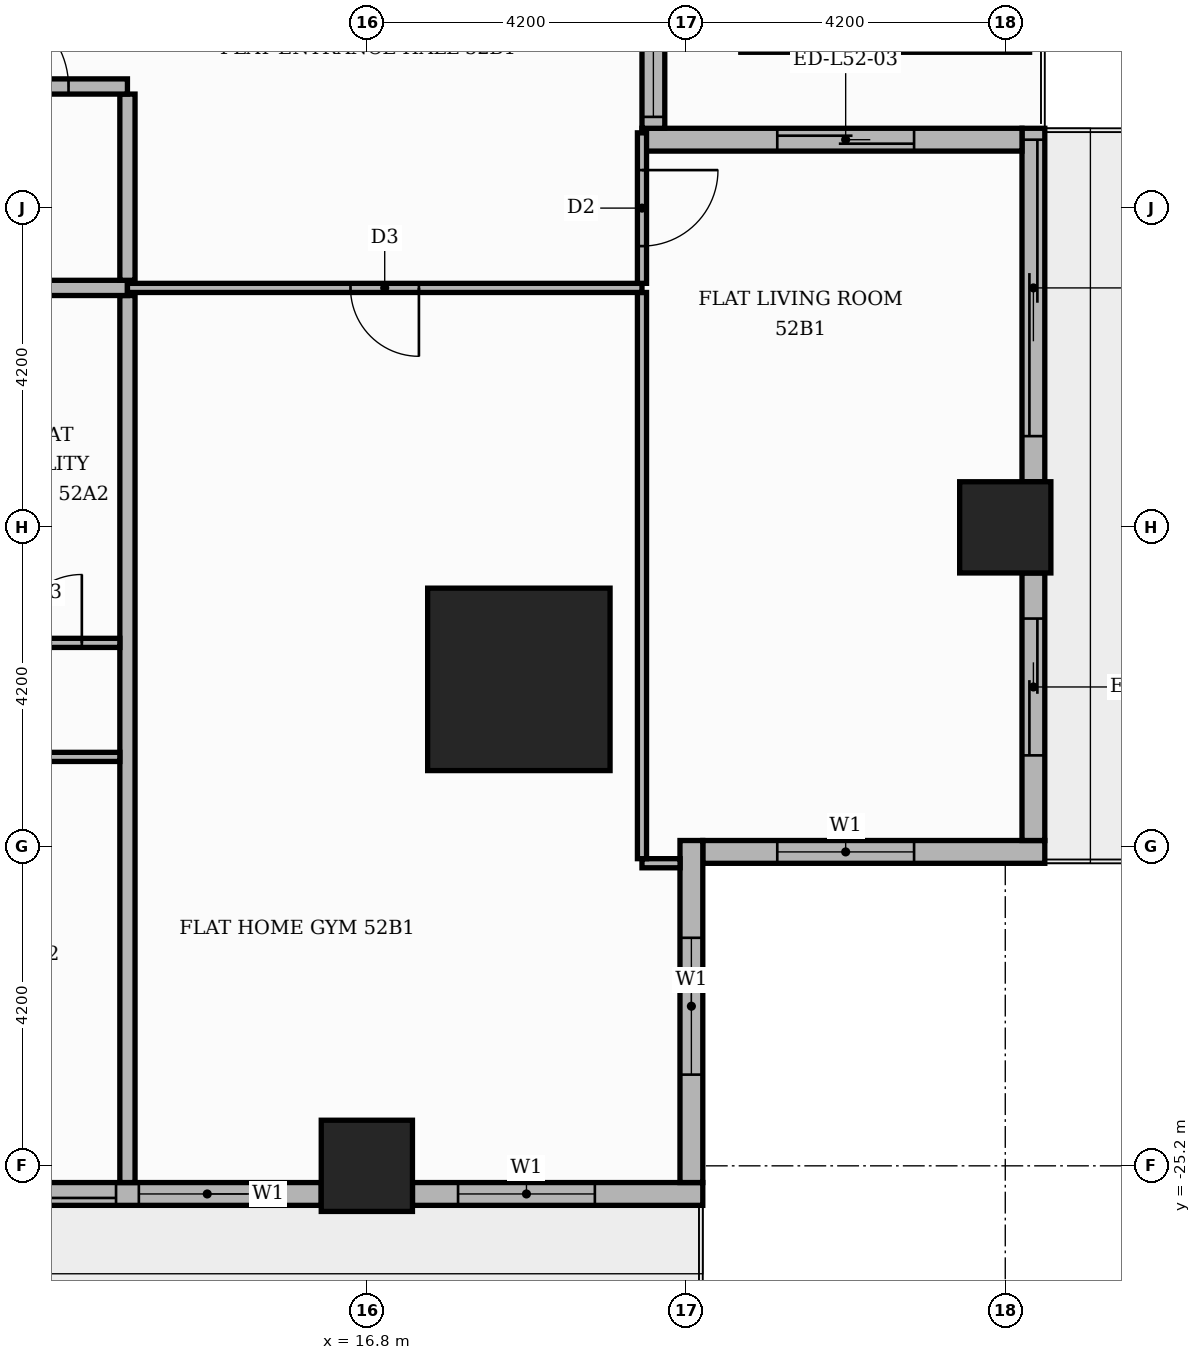
"""IFC4 building model, lengths in metres.
Left out: names, types, materials, properties, quantities, classifications, styles, units other than length and angle.
Written with IfcOpenShell. Run it as: python <this file> out.ifc"""

import sys

from ifc_helpers import new_model, si_unit, direction, frame, frame_2d, origin, origin_2d, place, context, subcontext, project, spatial, rectangle, extrude, element, fill, save


model = new_model("IFC4")
c1 = context("Model", 3, precision=1e-05, world=origin(), true_north=direction((0.0, 1.0)))
c2 = subcontext(c1, "Body", "Model", "MODEL_VIEW")
j1 = project(units=[si_unit("LENGTHUNIT", "METRE"), si_unit("PLANEANGLEUNIT", "RADIAN")], contexts=[c1])
p1 = place(None, origin())
s1 = spatial("IfcSite", under=j1, at=p1, CompositionType="ELEMENT")
p2 = place(p1, origin())
s2 = spatial("IfcBuilding", under=s1, at=p2, CompositionType="ELEMENT")
p3 = place(p2, frame((0.0, 0.0, 219.6)))
s3 = spatial("IfcBuildingStorey", under=s2, at=p3, CompositionType="ELEMENT", Elevation=219.6)
p4 = place(p3, frame((18.8, -18.8, 0.0), z_axis=(0.0, 0.0, 1.0), x_axis=(1.0, 0.0, 0.0)))
e1 = element("IfcColumn", 1, at=p4, inside=s3, PredefinedType="COLUMN", context=c2, shape_type="SweptSolid", body=[
    extrude(rectangle(XDim=2.4, YDim=2.4, at=origin_2d()), origin(), (0.0, 0.0, 1.0), 3.9),
])
for number, where, z_axis, x_axis in (
    (2, (25.2, -16.8, 0.0), (0.0, 0.0, 1.0), (1.0, 0.0, 0.0)),
    (3, (16.8, -25.2, 0.0), (0.0, 0.0, 1.0), (1.0, 0.0, 0.0)),
):
    element("IfcColumn", number, at=place(p3, frame(where, z_axis=z_axis, x_axis=x_axis)), inside=s3, PredefinedType="COLUMN", context=c2, shape_type="SweptSolid", body=[
        extrude(rectangle(XDim=1.2, YDim=1.2, at=origin_2d()), origin(), (0.0, 0.0, 1.0), 3.9),
    ])
p5 = place(p3, frame((21.22, -21.07, 0.0), z_axis=(0.0, 0.0, 1.0), x_axis=(1.0, 0.0, 0.0)))
e4 = element("IfcWall", 4, at=p5, inside=s3, PredefinedType="STANDARD", context=c2, shape_type="SweptSolid", body=[
    extrude(rectangle(XDim=4.5, YDim=0.3, at=frame_2d((2.25, 0.0))), origin(), (0.0, 0.0, 1.0), 3.48),
])
p6 = place(p5, frame((0.98, 0.0, 0.9)))
e5 = element("IfcOpeningElement", 5, at=p6, cuts=e4, PredefinedType="OPENING", context=c2, shape_type="SweptSolid", body=[
    extrude(rectangle(XDim=1.8, YDim=2.1, at=frame_2d((0.9, 1.05))), frame((0.0, 0.16, 0.0), z_axis=(0.0, -1.0, 0.0), x_axis=(1.0, 0.0, 0.0)), (0.0, 0.0, 1.0), 0.32),
])
p7 = place(p3, frame((25.57, -20.92, 0.0), z_axis=(0.0, 0.0, 1.0), x_axis=(0.0, 1.0, 0.0)))
e6 = element("IfcWall", 6, at=p7, inside=s3, PredefinedType="STANDARD", context=c2, shape_type="SweptSolid", body=[
    extrude(rectangle(XDim=3.52, YDim=0.3, at=frame_2d((1.76, 0.0))), origin(), (0.0, 0.0, 1.0), 3.48),
])
p8 = place(p7, frame((1.12, 0.0, 0.0)))
e7 = element("IfcOpeningElement", 7, at=p8, cuts=e6, PredefinedType="OPENING", context=c2, shape_type="SweptSolid", body=[
    extrude(rectangle(XDim=1.8, YDim=2.4, at=frame_2d((0.9, 1.2))), frame((0.0, 0.16, 0.0), z_axis=(0.0, -1.0, 0.0), x_axis=(1.0, 0.0, 0.0)), (0.0, 0.0, 1.0), 0.32),
])
p9 = place(p3, frame((25.57, -16.2, 0.0), z_axis=(0.0, 0.0, 1.0), x_axis=(0.0, 1.0, 0.0)))
e8 = element("IfcWall", 8, at=p9, inside=s3, PredefinedType="STANDARD", context=c2, shape_type="SweptSolid", body=[
    extrude(rectangle(XDim=4.65, YDim=0.3, at=frame_2d((2.325, 0.0))), origin(), (0.0, 0.0, 1.0), 3.48),
])
p10 = place(p9, frame((0.6, 0.0, 0.0)))
e9 = element("IfcOpeningElement", 9, at=p10, cuts=e8, PredefinedType="OPENING", context=c2, shape_type="SweptSolid", body=[
    extrude(rectangle(XDim=3.9, YDim=2.4, at=frame_2d((1.95, 1.2))), frame((0.0, 0.16, 0.0), z_axis=(0.0, -1.0, 0.0), x_axis=(1.0, 0.0, 0.0)), (0.0, 0.0, 1.0), 0.32),
])
p11 = place(p3, frame((25.42, -11.7, 0.0), z_axis=(0.0, 0.0, 1.0), x_axis=(-1.0, 0.0, 0.0)))
e10 = element("IfcWall", 10, at=p11, inside=s3, PredefinedType="STANDARD", context=c2, shape_type="SweptSolid", body=[
    extrude(rectangle(XDim=5.0, YDim=0.3, at=frame_2d((2.5, 0.0))), origin(), (0.0, 0.0, 1.0), 3.48),
])
p12 = place(p11, frame((1.42, 0.0, 0.0)))
e11 = element("IfcOpeningElement", 11, at=p12, cuts=e10, PredefinedType="OPENING", context=c2, shape_type="SweptSolid", body=[
    extrude(rectangle(XDim=1.8, YDim=2.4, at=frame_2d((0.9, 1.2))), frame((0.0, 0.16, 0.0), z_axis=(0.0, -1.0, 0.0), x_axis=(1.0, 0.0, 0.0)), (0.0, 0.0, 1.0), 0.32),
])
p13 = place(p3, frame((20.57, -11.55, 0.0), z_axis=(0.0, 0.0, 1.0), x_axis=(0.0, 1.0, 0.0)))
e12 = element("IfcWall", 12, at=p13, inside=s3, PredefinedType="STANDARD", context=c2, shape_type="SweptSolid", body=[
    extrude(rectangle(XDim=23.4, YDim=0.3, at=frame_2d((11.7, 0.0))), origin(), (0.0, 0.0, 1.0), 3.48),
])
p14 = place(p13, frame((0.15, 0.0, 0.9)))
e13 = element("IfcOpeningElement", 13, at=p14, cuts=e12, PredefinedType="OPENING", context=c2, shape_type="SweptSolid", body=[
    extrude(rectangle(XDim=6.0, YDim=2.1, at=frame_2d((3.0, 1.05))), frame((0.0, 0.16, 0.0), z_axis=(0.0, -1.0, 0.0), x_axis=(1.0, 0.0, 0.0)), (0.0, 0.0, 1.0), 0.32),
])
p15 = place(p13, frame((6.45, 0.0, 0.9)))
e14 = element("IfcOpeningElement", 14, at=p15, cuts=e12, PredefinedType="OPENING", context=c2, shape_type="SweptSolid", body=[
    extrude(rectangle(XDim=6.0, YDim=2.1, at=frame_2d((3.0, 1.05))), frame((0.0, 0.16, 0.0), z_axis=(0.0, -1.0, 0.0), x_axis=(1.0, 0.0, 0.0)), (0.0, 0.0, 1.0), 0.32),
])
p16 = place(p13, frame((12.75, 0.0, 0.9)))
e15 = element("IfcOpeningElement", 15, at=p16, cuts=e12, PredefinedType="OPENING", context=c2, shape_type="SweptSolid", body=[
    extrude(rectangle(XDim=6.0, YDim=2.1, at=frame_2d((3.0, 1.05))), frame((0.0, 0.16, 0.0), z_axis=(0.0, -1.0, 0.0), x_axis=(1.0, 0.0, 0.0)), (0.0, 0.0, 1.0), 0.32),
])
p17 = place(p13, frame((19.05, 0.0, 0.9)))
e16 = element("IfcOpeningElement", 16, at=p17, cuts=e12, PredefinedType="OPENING", context=c2, shape_type="SweptSolid", body=[
    extrude(rectangle(XDim=3.9, YDim=2.1, at=frame_2d((1.95, 1.05))), frame((0.0, 0.16, 0.0), z_axis=(0.0, -1.0, 0.0), x_axis=(1.0, 0.0, 0.0)), (0.0, 0.0, 1.0), 0.32),
])
p18 = place(p3, frame((9.0, -25.57, 0.0), z_axis=(0.0, 0.0, 1.0), x_axis=(1.0, 0.0, 0.0)))
e17 = element("IfcWall", 17, at=p18, inside=s3, PredefinedType="STANDARD", context=c2, shape_type="SweptSolid", body=[
    extrude(rectangle(XDim=7.2, YDim=0.3, at=frame_2d((3.6, 0.0))), origin(), (0.0, 0.0, 1.0), 3.48),
])
p19 = place(p18, frame((0.6, 0.0, 0.0)))
e18 = element("IfcOpeningElement", 18, at=p19, cuts=e17, PredefinedType="OPENING", context=c2, shape_type="SweptSolid", body=[
    extrude(rectangle(XDim=3.9, YDim=2.4, at=frame_2d((1.95, 1.2))), frame((0.0, 0.16, 0.0), z_axis=(0.0, -1.0, 0.0), x_axis=(1.0, 0.0, 0.0)), (0.0, 0.0, 1.0), 0.32),
])
p20 = place(p18, frame((4.8, 0.0, 0.9)))
e19 = element("IfcOpeningElement", 19, at=p20, cuts=e17, PredefinedType="OPENING", context=c2, shape_type="SweptSolid", body=[
    extrude(rectangle(XDim=1.8, YDim=2.1, at=frame_2d((0.9, 1.05))), frame((0.0, 0.16, 0.0), z_axis=(0.0, -1.0, 0.0), x_axis=(1.0, 0.0, 0.0)), (0.0, 0.0, 1.0), 0.32),
])
p21 = place(p3, frame((17.4, -25.57, 0.0), z_axis=(0.0, 0.0, 1.0), x_axis=(1.0, 0.0, 0.0)))
e20 = element("IfcWall", 20, at=p21, inside=s3, PredefinedType="STANDARD", context=c2, shape_type="SweptSolid", body=[
    extrude(rectangle(XDim=3.82, YDim=0.3, at=frame_2d((1.91, 0.0))), origin(), (0.0, 0.0, 1.0), 3.48),
])
p22 = place(p21, frame((0.6, 0.0, 0.9)))
e21 = element("IfcOpeningElement", 21, at=p22, cuts=e20, PredefinedType="OPENING", context=c2, shape_type="SweptSolid", body=[
    extrude(rectangle(XDim=1.8, YDim=2.1, at=frame_2d((0.9, 1.05))), frame((0.0, 0.16, 0.0), z_axis=(0.0, -1.0, 0.0), x_axis=(1.0, 0.0, 0.0)), (0.0, 0.0, 1.0), 0.32),
])
p23 = place(p3, frame((21.07, -25.42, 0.0), z_axis=(0.0, 0.0, 1.0), x_axis=(0.0, 1.0, 0.0)))
e22 = element("IfcWall", 22, at=p23, inside=s3, PredefinedType="STANDARD", context=c2, shape_type="SweptSolid", body=[
    extrude(rectangle(XDim=4.5, YDim=0.3, at=frame_2d((2.25, 0.0))), origin(), (0.0, 0.0, 1.0), 3.48),
])
p24 = place(p23, frame((1.42, 0.0, 0.9)))
e23 = element("IfcOpeningElement", 23, at=p24, cuts=e22, PredefinedType="OPENING", context=c2, shape_type="SweptSolid", body=[
    extrude(rectangle(XDim=1.8, YDim=2.1, at=frame_2d((0.9, 1.05))), frame((0.0, 0.16, 0.0), z_axis=(0.0, -1.0, 0.0), x_axis=(1.0, 0.0, 0.0)), (0.0, 0.0, 1.0), 0.32),
])
p25 = place(p3, frame((13.65, -25.42, 0.0), z_axis=(0.0, 0.0, 1.0), x_axis=(0.0, 1.0, 0.0)))
e24 = element("IfcWall", 24, at=p25, inside=s3, PredefinedType="PARTITIONING", context=c2, shape_type="SweptSolid", body=[
    extrude(rectangle(XDim=11.67, YDim=0.2, at=frame_2d((5.835, 0.0))), origin(), (0.0, 0.0, 1.0), 3.48),
])
p26 = place(p3, frame((20.42, -21.219, 0.0), z_axis=(0.0, 0.0, 1.0), x_axis=(1.0, 0.0, 0.0)))
e25 = element("IfcWall", 25, at=p26, inside=s3, PredefinedType="PARTITIONING", context=c2, shape_type="SweptSolid", body=[
    extrude(rectangle(XDim=0.501, YDim=0.12, at=frame_2d((0.25, 0.0))), origin(), (0.0, 0.0, 1.0), 3.48),
])
p27 = place(p3, frame((20.42, -21.159, 0.0), z_axis=(0.0, 0.0, 1.0), x_axis=(0.0, 1.0, 0.0)))
e26 = element("IfcWall", 26, at=p27, inside=s3, PredefinedType="PARTITIONING", context=c2, shape_type="SweptSolid", body=[
    extrude(rectangle(XDim=7.449, YDim=0.12, at=frame_2d((3.725, 0.0))), origin(), (0.0, 0.0, 1.0), 3.48),
])
p28 = place(p3, frame((-5.15, -19.82, 0.0), z_axis=(0.0, 0.0, 1.0), x_axis=(1.0, 0.0, 0.0)))
e27 = element("IfcWall", 27, at=p28, inside=s3, PredefinedType="PARTITIONING", context=c2, shape_type="SweptSolid", body=[
    extrude(rectangle(XDim=18.7, YDim=0.12, at=frame_2d((9.35, 0.0))), origin(), (0.0, 0.0, 1.0), 3.48),
])
p29 = place(p28, frame((3.65, 0.0, 0.0)))
e28 = element("IfcOpeningElement", 28, at=p29, cuts=e27, PredefinedType="OPENING", context=c2, shape_type="SweptSolid", body=[
    extrude(rectangle(XDim=0.9, YDim=2.1, at=frame_2d((0.45, 1.05))), frame((0.0, 0.07, 0.0), z_axis=(0.0, -1.0, 0.0), x_axis=(1.0, 0.0, 0.0)), (0.0, 0.0, 1.0), 0.14),
])
p30 = place(p28, frame((15.15, 0.0, 0.0)))
e29 = element("IfcOpeningElement", 29, at=p30, cuts=e27, PredefinedType="OPENING", context=c2, shape_type="SweptSolid", body=[
    extrude(rectangle(XDim=1.0, YDim=2.1, at=frame_2d((0.5, 1.05))), frame((0.0, 0.07, 0.0), z_axis=(0.0, -1.0, 0.0), x_axis=(1.0, 0.0, 0.0)), (0.0, 0.0, 1.0), 0.14),
])
p31 = place(p3, frame((-1.05, -18.32, 0.0), z_axis=(0.0, 0.0, 1.0), x_axis=(1.0, 0.0, 0.0)))
e30 = element("IfcWall", 30, at=p31, inside=s3, PredefinedType="PARTITIONING", context=c2, shape_type="SweptSolid", body=[
    extrude(rectangle(XDim=14.6, YDim=0.12, at=frame_2d((7.3, 0.0))), origin(), (0.0, 0.0, 1.0), 3.48),
])
p32 = place(p31, frame((2.775, 0.0, 0.0)))
e31 = element("IfcOpeningElement", 31, at=p32, cuts=e30, PredefinedType="OPENING", context=c2, shape_type="SweptSolid", body=[
    extrude(rectangle(XDim=0.9, YDim=2.1, at=frame_2d((0.45, 1.05))), frame((0.0, 0.07, 0.0), z_axis=(0.0, -1.0, 0.0), x_axis=(1.0, 0.0, 0.0)), (0.0, 0.0, 1.0), 0.14),
])
p33 = place(p31, frame((6.975, 0.0, 0.0)))
e32 = element("IfcOpeningElement", 32, at=p33, cuts=e30, PredefinedType="OPENING", context=c2, shape_type="SweptSolid", body=[
    extrude(rectangle(XDim=0.9, YDim=2.1, at=frame_2d((0.45, 1.05))), frame((0.0, 0.07, 0.0), z_axis=(0.0, -1.0, 0.0), x_axis=(1.0, 0.0, 0.0)), (0.0, 0.0, 1.0), 0.14),
])
p34 = place(p31, frame((10.05, 0.0, 0.0)))
e33 = element("IfcOpeningElement", 33, at=p34, cuts=e30, PredefinedType="OPENING", context=c2, shape_type="SweptSolid", body=[
    extrude(rectangle(XDim=0.9, YDim=2.1, at=frame_2d((0.45, 1.05))), frame((0.0, 0.07, 0.0), z_axis=(0.0, -1.0, 0.0), x_axis=(1.0, 0.0, 0.0)), (0.0, 0.0, 1.0), 0.14),
])
p35 = place(p31, frame((13.2, 0.0, 0.0)))
e34 = element("IfcOpeningElement", 34, at=p35, cuts=e30, PredefinedType="OPENING", context=c2, shape_type="SweptSolid", body=[
    extrude(rectangle(XDim=0.9, YDim=2.1, at=frame_2d((0.45, 1.05))), frame((0.0, 0.07, 0.0), z_axis=(0.0, -1.0, 0.0), x_axis=(1.0, 0.0, 0.0)), (0.0, 0.0, 1.0), 0.14),
])
p36 = place(p3, frame((-25.42, -13.65, 0.0), z_axis=(0.0, 0.0, 1.0), x_axis=(1.0, 0.0, 0.0)))
e35 = element("IfcWall", 35, at=p36, inside=s3, PredefinedType="PARTITIONING", context=c2, shape_type="SweptSolid", body=[
    extrude(rectangle(XDim=39.07, YDim=0.2, at=frame_2d((19.535, 0.0))), origin(), (0.0, 0.0, 1.0), 3.48),
])
p37 = place(p36, frame((13.32, 0.0, 0.0)))
e36 = element("IfcOpeningElement", 36, at=p37, cuts=e35, PredefinedType="OPENING", context=c2, shape_type="SweptSolid", body=[
    extrude(rectangle(XDim=1.1, YDim=2.4, at=frame_2d((0.55, 1.2))), frame((0.0, 0.11, 0.0), z_axis=(0.0, -1.0, 0.0), x_axis=(1.0, 0.0, 0.0)), (0.0, 0.0, 1.0), 0.22),
])
p38 = place(p36, frame((21.72, 0.0, 0.0)))
e37 = element("IfcOpeningElement", 37, at=p38, cuts=e35, PredefinedType="OPENING", context=c2, shape_type="SweptSolid", body=[
    extrude(rectangle(XDim=1.1, YDim=2.4, at=frame_2d((0.55, 1.2))), frame((0.0, 0.11, 0.0), z_axis=(0.0, -1.0, 0.0), x_axis=(1.0, 0.0, 0.0)), (0.0, 0.0, 1.0), 0.22),
])
p39 = place(p3, frame((13.65, -13.65, 0.0), z_axis=(0.0, 0.0, 1.0), x_axis=(1.0, 0.0, 0.0)))
e38 = element("IfcWall", 38, at=p39, inside=s3, PredefinedType="PARTITIONING", context=c2, shape_type="SweptSolid", body=[
    extrude(rectangle(XDim=6.77, YDim=0.12, at=frame_2d((3.385, 0.0))), origin(), (0.0, 0.0, 1.0), 3.48),
])
p40 = place(p39, frame((2.935, 0.0, 0.0)))
e39 = element("IfcOpeningElement", 39, at=p40, cuts=e38, PredefinedType="OPENING", context=c2, shape_type="SweptSolid", body=[
    extrude(rectangle(XDim=0.9, YDim=2.1, at=frame_2d((0.45, 1.05))), frame((0.0, 0.07, 0.0), z_axis=(0.0, -1.0, 0.0), x_axis=(1.0, 0.0, 0.0)), (0.0, 0.0, 1.0), 0.14),
])
p41 = place(p3, frame((20.42, -13.59, 0.0), z_axis=(0.0, 0.0, 1.0), x_axis=(0.0, 1.0, 0.0)))
e40 = element("IfcWall", 40, at=p41, inside=s3, PredefinedType="PARTITIONING", context=c2, shape_type="SweptSolid", body=[
    extrude(rectangle(XDim=1.98, YDim=0.12, at=frame_2d((0.99, 0.0))), origin(), (0.0, 0.0, 1.0), 3.48),
])
p42 = place(p41, frame((0.49, 0.0, 0.0)))
e41 = element("IfcOpeningElement", 41, at=p42, cuts=e40, PredefinedType="OPENING", context=c2, shape_type="SweptSolid", body=[
    extrude(rectangle(XDim=1.0, YDim=2.1, at=frame_2d((0.5, 1.05))), frame((0.0, 0.07, 0.0), z_axis=(0.0, -1.0, 0.0), x_axis=(1.0, 0.0, 0.0)), (0.0, 0.0, 1.0), 0.14),
])
p43 = place(p3, frame((13.65, -13.55, 0.0), z_axis=(0.0, 0.0, 1.0), x_axis=(0.0, 1.0, 0.0)))
e42 = element("IfcWall", 42, at=p43, inside=s3, PredefinedType="PARTITIONING", context=c2, shape_type="SweptSolid", body=[
    extrude(rectangle(XDim=2.45, YDim=0.2, at=frame_2d((1.225, 0.0))), origin(), (0.0, 0.0, 1.0), 3.48),
])
p44 = place(p3, frame((11.0, -11.0, 0.0), z_axis=(0.0, 0.0, 1.0), x_axis=(1.0, 0.0, 0.0)))
e43 = element("IfcWall", 43, at=p44, inside=s3, PredefinedType="PARTITIONING", context=c2, shape_type="SweptSolid", body=[
    extrude(rectangle(XDim=2.65, YDim=0.2, at=frame_2d((1.325, 0.0))), origin(), (0.0, 0.0, 1.0), 3.48),
])
p45 = place(p44, frame((0.775, 0.0, 0.0)))
e44 = element("IfcOpeningElement", 44, at=p45, cuts=e43, PredefinedType="OPENING", context=c2, shape_type="SweptSolid", body=[
    extrude(rectangle(XDim=1.1, YDim=2.4, at=frame_2d((0.55, 1.2))), frame((0.0, 0.11, 0.0), z_axis=(0.0, -1.0, 0.0), x_axis=(1.0, 0.0, 0.0)), (0.0, 0.0, 1.0), 0.22),
])
p46 = place(p6, origin())
e45 = element("IfcWindow", 45, at=p46, inside=s3, PartitioningType="SINGLE_PANEL", PredefinedType="WINDOW", context=c2, shape_type="SweptSolid", body=[
    extrude(rectangle(XDim=1.8, YDim=2.1, at=frame_2d((0.9, 1.05))), frame((0.0, 0.03, 0.0), z_axis=(0.0, -1.0, 0.0), x_axis=(1.0, 0.0, 0.0)), (0.0, 0.0, 1.0), 0.06),
])
fill(e5, e45)
p47 = place(p8, origin())
e46 = element("IfcDoor", 46, at=p47, inside=s3, OperationType="SLIDING_TO_RIGHT", PredefinedType="DOOR", context=c2, shape_type="SweptSolid", body=[
    extrude(rectangle(XDim=1.8, YDim=2.4, at=frame_2d((0.9, 1.2))), frame((0.0, 0.025, 0.0), z_axis=(0.0, -1.0, 0.0), x_axis=(1.0, 0.0, 0.0)), (0.0, 0.0, 1.0), 0.05),
])
fill(e7, e46)
p48 = place(p10, origin())
e47 = element("IfcDoor", 47, at=p48, inside=s3, OperationType="SLIDING_TO_LEFT", PredefinedType="DOOR", context=c2, shape_type="SweptSolid", body=[
    extrude(rectangle(XDim=3.9, YDim=2.4, at=frame_2d((1.95, 1.2))), frame((0.0, 0.025, 0.0), z_axis=(0.0, -1.0, 0.0), x_axis=(1.0, 0.0, 0.0)), (0.0, 0.0, 1.0), 0.05),
])
fill(e9, e47)
p49 = place(p12, origin())
e48 = element("IfcDoor", 48, at=p49, inside=s3, OperationType="SLIDING_TO_LEFT", PredefinedType="DOOR", context=c2, shape_type="SweptSolid", body=[
    extrude(rectangle(XDim=1.8, YDim=2.4, at=frame_2d((0.9, 1.2))), frame((0.0, 0.025, 0.0), z_axis=(0.0, -1.0, 0.0), x_axis=(1.0, 0.0, 0.0)), (0.0, 0.0, 1.0), 0.05),
])
fill(e11, e48)
p50 = place(p14, origin())
e49 = element("IfcWindow", 49, at=p50, inside=s3, PartitioningType="SINGLE_PANEL", PredefinedType="WINDOW", context=c2, shape_type="SweptSolid", body=[
    extrude(rectangle(XDim=6.0, YDim=2.1, at=frame_2d((3.0, 1.05))), frame((0.0, 0.03, 0.0), z_axis=(0.0, -1.0, 0.0), x_axis=(1.0, 0.0, 0.0)), (0.0, 0.0, 1.0), 0.06),
])
fill(e13, e49)
p51 = place(p19, origin())
e50 = element("IfcDoor", 50, at=p51, inside=s3, OperationType="SLIDING_TO_LEFT", PredefinedType="DOOR", context=c2, shape_type="SweptSolid", body=[
    extrude(rectangle(XDim=3.9, YDim=2.4, at=frame_2d((1.95, 1.2))), frame((0.0, 0.025, 0.0), z_axis=(0.0, -1.0, 0.0), x_axis=(1.0, 0.0, 0.0)), (0.0, 0.0, 1.0), 0.05),
])
fill(e18, e50)
p52 = place(p20, origin())
e51 = element("IfcWindow", 51, at=p52, inside=s3, PartitioningType="SINGLE_PANEL", PredefinedType="WINDOW", context=c2, shape_type="SweptSolid", body=[
    extrude(rectangle(XDim=1.8, YDim=2.1, at=frame_2d((0.9, 1.05))), frame((0.0, 0.03, 0.0), z_axis=(0.0, -1.0, 0.0), x_axis=(1.0, 0.0, 0.0)), (0.0, 0.0, 1.0), 0.06),
])
fill(e19, e51)
p53 = place(p22, origin())
e52 = element("IfcWindow", 52, at=p53, inside=s3, PartitioningType="SINGLE_PANEL", PredefinedType="WINDOW", context=c2, shape_type="SweptSolid", body=[
    extrude(rectangle(XDim=1.8, YDim=2.1, at=frame_2d((0.9, 1.05))), frame((0.0, 0.03, 0.0), z_axis=(0.0, -1.0, 0.0), x_axis=(1.0, 0.0, 0.0)), (0.0, 0.0, 1.0), 0.06),
])
fill(e21, e52)
p54 = place(p24, origin())
e53 = element("IfcWindow", 53, at=p54, inside=s3, PartitioningType="SINGLE_PANEL", PredefinedType="WINDOW", context=c2, shape_type="SweptSolid", body=[
    extrude(rectangle(XDim=1.8, YDim=2.1, at=frame_2d((0.9, 1.05))), frame((0.0, 0.03, 0.0), z_axis=(0.0, -1.0, 0.0), x_axis=(1.0, 0.0, 0.0)), (0.0, 0.0, 1.0), 0.06),
])
fill(e23, e53)
p55 = place(p35, origin())
e54 = element("IfcDoor", 54, at=p55, inside=s3, OperationType="SINGLE_SWING_RIGHT", PredefinedType="DOOR", context=c2, shape_type="SweptSolid", body=[
    extrude(rectangle(XDim=0.9, YDim=2.1, at=frame_2d((0.45, 1.05))), frame((0.0, 0.025, 0.0), z_axis=(0.0, -1.0, 0.0), x_axis=(1.0, 0.0, 0.0)), (0.0, 0.0, 1.0), 0.05),
])
fill(e34, e54)
p56 = place(p45, origin())
e55 = element("IfcDoor", 55, at=p56, inside=s3, OperationType="SINGLE_SWING_LEFT", PredefinedType="DOOR", context=c2, shape_type="SweptSolid", body=[
    extrude(rectangle(XDim=1.1, YDim=2.4, at=frame_2d((0.55, 1.2))), frame((0.0, 0.025, 0.0), z_axis=(0.0, -1.0, 0.0), x_axis=(1.0, 0.0, 0.0)), (0.0, 0.0, 1.0), 0.05),
])
fill(e44, e55)
p57 = place(p40, frame((0.9, 0.0, 0.0), z_axis=(0.0, 0.0, 1.0), x_axis=(-1.0, 0.0, 0.0)))
e56 = element("IfcDoor", 56, at=p57, inside=s3, OperationType="SINGLE_SWING_RIGHT", PredefinedType="DOOR", context=c2, shape_type="SweptSolid", body=[
    extrude(rectangle(XDim=0.9, YDim=2.1, at=frame_2d((0.45, 1.05))), frame((0.0, 0.025, 0.0), z_axis=(0.0, -1.0, 0.0), x_axis=(1.0, 0.0, 0.0)), (0.0, 0.0, 1.0), 0.05),
])
fill(e39, e56)
p58 = place(p42, frame((1.0, 0.0, 0.0), z_axis=(0.0, 0.0, 1.0), x_axis=(-1.0, 0.0, 0.0)))
e57 = element("IfcDoor", 57, at=p58, inside=s3, OperationType="SINGLE_SWING_RIGHT", PredefinedType="DOOR", context=c2, shape_type="SweptSolid", body=[
    extrude(rectangle(XDim=1.0, YDim=2.1, at=frame_2d((0.5, 1.05))), frame((0.0, 0.025, 0.0), z_axis=(0.0, -1.0, 0.0), x_axis=(1.0, 0.0, 0.0)), (0.0, 0.0, 1.0), 0.05),
])
fill(e41, e57)
save(model, sys.argv[1])
